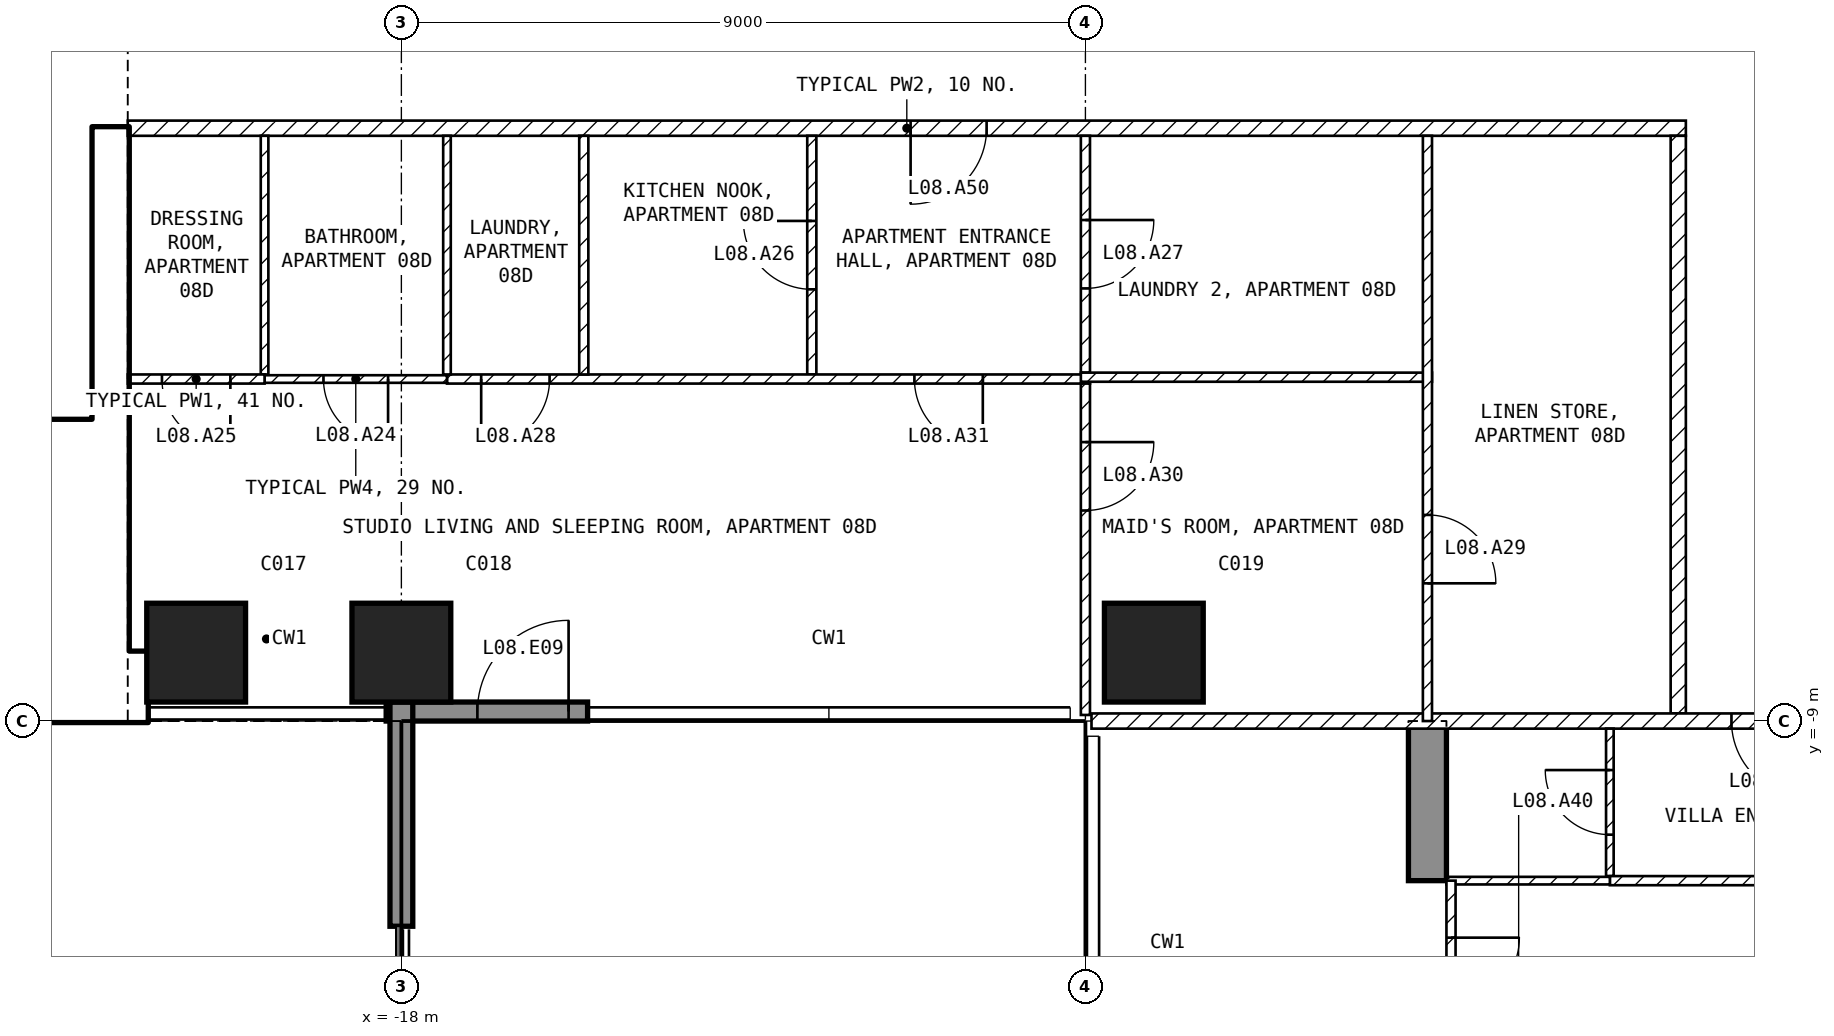
"""IFC4 building model, lengths in metres.
Left out: names, types, materials, properties, quantities, classifications, styles, units other than length and angle.
Written with IfcOpenShell. Run it as: python <this file> out.ifc"""

import sys

from ifc_helpers import new_model, si_unit, direction, frame, frame_2d, origin, origin_2d, place, context, subcontext, project, spatial, polyline, rectangle, outline, extrude, element, fill, save


model = new_model("IFC4")
c1 = context("Model", 3, precision=1e-05, world=origin(), true_north=direction((0.0, 1.0)))
c2 = subcontext(c1, "Body", "Model", "MODEL_VIEW")
j1 = project(units=[si_unit("LENGTHUNIT", "METRE"), si_unit("PLANEANGLEUNIT", "RADIAN")], contexts=[c1])
p1 = place(None, origin())
s1 = spatial("IfcSite", under=j1, at=p1, CompositionType="ELEMENT")
p2 = place(p1, origin())
s2 = spatial("IfcBuilding", under=s1, at=p2, CompositionType="ELEMENT")
p3 = place(p2, frame((0.0, 0.0, 47.0)))
s3 = spatial("IfcBuildingStorey", under=s2, at=p3, CompositionType="ELEMENT", Elevation=47.0)
for number, where, z_axis, x_axis in (
    (1, (-20.7, -8.1, -0.25), (0.0, 0.0, 1.0), (1.0, 0.0, 0.0)),
    (2, (-18.0, -8.1, -0.25), (0.0, 0.0, 1.0), (1.0, 0.0, 0.0)),
    (3, (-8.1, -8.1, -0.25), (0.0, 0.0, 1.0), (1.0, 0.0, 0.0)),
):
    element("IfcColumn", number, at=place(p3, frame(where, z_axis=z_axis, x_axis=x_axis)), inside=s3, PredefinedType="COLUMN", context=c2, shape_type="SweptSolid", body=[
        extrude(rectangle(XDim=1.3, YDim=1.3, at=origin_2d()), origin(), (0.0, 0.0, 1.0), 3.5),
    ])
p4 = place(p3, frame((-4.75, -25.45, -0.25), z_axis=(1.0, 0.0, 0.0), x_axis=(0.0, 1.0, 0.0)))
e4 = element("IfcWall", 4, at=p4, inside=s3, PredefinedType="SHEAR", context=c2, shape_type="SweptSolid", body=[
    extrude(outline(polyline([(0.0, 0.0), (4.15, 0.0), (4.15, 2.65), (6.55, 2.65), (6.55, 0.0), (11.95, 0.0), (11.95, 2.65), (14.35, 2.65), (14.35, 0.0), (16.45, 0.0), (16.45, 3.5), (0.0, 3.5), (0.0, 0.0)])), origin(), (0.0, 0.0, 1.0), 0.5),
])
p5 = place(p3, frame((-18.2, -8.875, 0.0), z_axis=(0.0, 0.0, 1.0), x_axis=(1.0, 0.0, 0.0)))
e5 = element("IfcWall", 5, at=p5, inside=s3, PredefinedType="SOLIDWALL", context=c2, shape_type="SweptSolid", body=[
    extrude(rectangle(XDim=2.65, YDim=0.25, at=frame_2d((1.325, 0.0))), origin(), (0.0, 0.0, 1.0), 3.25),
])
p6 = place(p5, frame((1.2, 0.0, 0.0)))
e6 = element("IfcOpeningElement", 6, at=p6, cuts=e5, PredefinedType="OPENING", context=c2, shape_type="SweptSolid", body=[
    extrude(rectangle(XDim=1.2, YDim=2.4, at=frame_2d((0.6, 1.2))), frame((0.0, 0.135, 0.0), z_axis=(0.0, -1.0, 0.0), x_axis=(1.0, 0.0, 0.0)), (0.0, 0.0, 1.0), 0.27),
])
p7 = place(p3, frame((-18.0, -8.75, 0.0), z_axis=(0.0, 0.0, 1.0), x_axis=(0.0, -1.0, 0.0)))
e7 = element("IfcWall", 7, at=p7, inside=s3, PredefinedType="SOLIDWALL", context=c2, shape_type="SweptSolid", body=[
    extrude(rectangle(XDim=2.95, YDim=0.3, at=frame_2d((1.475, 0.0))), origin(), (0.0, 0.0, 1.0), 3.25),
])
p8 = place(p3, frame((-32.4, -8.55, 0.0), z_axis=(0.0, 0.0, 1.0), x_axis=(1.0, 0.0, 0.0)))
e8 = element("IfcWall", 8, at=p8, inside=s3, PredefinedType="SHEAR", context=c2, shape_type="SweptSolid", body=[
    extrude(rectangle(XDim=11.05, YDim=0.9, at=frame_2d((5.525, 0.0))), origin(), (0.0, 0.0, 1.0), 3.25),
])
p9 = place(p3, frame((-21.825, -8.1, 0.0), z_axis=(0.0, 0.0, 1.0), x_axis=(0.0, 1.0, 0.0)))
e9 = element("IfcWall", 9, at=p9, inside=s3, PredefinedType="SHEAR", context=c2, shape_type="SweptSolid", body=[
    extrude(rectangle(XDim=6.9, YDim=0.45, at=frame_2d((3.45, 0.0))), origin(), (0.0, 0.0, 1.0), 3.25),
])
p10 = place(p3, frame((-28.35, -5.15, 0.0), z_axis=(0.0, 0.0, 1.0), x_axis=(1.0, 0.0, 0.0)))
e10 = element("IfcWall", 10, at=p10, inside=s3, PredefinedType="SOLIDWALL", context=c2, shape_type="SweptSolid", body=[
    extrude(rectangle(XDim=6.3, YDim=0.2, at=frame_2d((3.15, 0.0))), origin(), (0.0, 0.0, 1.0), 3.25),
])
p11 = place(p10, frame((5.1, 0.0, 0.0)))
e11 = element("IfcOpeningElement", 11, at=p11, cuts=e10, PredefinedType="OPENING", context=c2, shape_type="SweptSolid", body=[
    extrude(rectangle(XDim=1.0, YDim=2.1, at=frame_2d((0.5, 1.05))), frame((0.0, 0.11, 0.0), z_axis=(0.0, -1.0, 0.0), x_axis=(1.0, 0.0, 0.0)), (0.0, 0.0, 1.0), 0.22),
])
p12 = place(p3, frame((-1.1, -1.2, 0.0), z_axis=(0.0, 0.0, 1.0), x_axis=(-1.0, 0.0, 0.0)))
e12 = element("IfcWall", 12, at=p12, inside=s3, PredefinedType="PARTITIONING", context=c2, shape_type="SweptSolid", body=[
    extrude(rectangle(XDim=20.5, YDim=0.2, at=frame_2d((10.25, 0.0))), origin(), (0.0, 0.0, 1.0), 3.25),
])
p13 = place(p12, frame((9.2, 0.0, 0.0)))
e13 = element("IfcOpeningElement", 13, at=p13, cuts=e12, PredefinedType="OPENING", context=c2, shape_type="SweptSolid", body=[
    extrude(rectangle(XDim=1.0, YDim=2.1, at=frame_2d((0.5, 1.05))), frame((0.0, 0.11, 0.0), z_axis=(0.0, -1.0, 0.0), x_axis=(1.0, 0.0, 0.0)), (0.0, 0.0, 1.0), 0.22),
])
p14 = place(p3, frame((-1.2, -8.9, 0.0), z_axis=(0.0, 0.0, 1.0), x_axis=(0.0, 1.0, 0.0)))
e14 = element("IfcWall", 14, at=p14, inside=s3, PredefinedType="PARTITIONING", context=c2, shape_type="SweptSolid", body=[
    extrude(rectangle(XDim=7.6, YDim=0.2, at=frame_2d((3.8, 0.0))), origin(), (0.0, 0.0, 1.0), 3.25),
])
p15 = place(p3, frame((8.92, -9.0, 0.0), z_axis=(0.0, 0.0, 1.0), x_axis=(-1.0, 0.0, 0.0)))
e15 = element("IfcWall", 15, at=p15, inside=s3, PredefinedType="PARTITIONING", context=c2, shape_type="SweptSolid", body=[
    extrude(rectangle(XDim=17.84, YDim=0.2, at=frame_2d((8.92, 0.0))), origin(), (0.0, 0.0, 1.0), 3.25),
])
p16 = place(p15, frame((8.42, 0.0, 0.0)))
e16 = element("IfcOpeningElement", 16, at=p16, cuts=e15, PredefinedType="OPENING", context=c2, shape_type="SweptSolid", body=[
    extrude(rectangle(XDim=1.0, YDim=2.1, at=frame_2d((0.5, 1.05))), frame((0.0, 0.11, 0.0), z_axis=(0.0, -1.0, 0.0), x_axis=(1.0, 0.0, 0.0)), (0.0, 0.0, 1.0), 0.22),
])
p17 = place(p3, frame((-12.6, -4.44, 0.0), z_axis=(0.0, 0.0, 1.0), x_axis=(0.0, 1.0, 0.0)))
e17 = element("IfcWall", 17, at=p17, inside=s3, PredefinedType="PARTITIONING", context=c2, shape_type="SweptSolid", body=[
    extrude(rectangle(XDim=3.14, YDim=0.12, at=frame_2d((1.57, 0.0))), origin(), (0.0, 0.0, 1.0), 3.25),
])
p18 = place(p17, frame((1.12, 0.0, 0.0)))
e18 = element("IfcOpeningElement", 18, at=p18, cuts=e17, PredefinedType="OPENING", context=c2, shape_type="SweptSolid", body=[
    extrude(rectangle(XDim=0.9, YDim=2.1, at=frame_2d((0.45, 1.05))), frame((0.0, 0.07, 0.0), z_axis=(0.0, -1.0, 0.0), x_axis=(1.0, 0.0, 0.0)), (0.0, 0.0, 1.0), 0.14),
])
p19 = place(p3, frame((-8.94, -4.5, 0.0), z_axis=(0.0, 0.0, 1.0), x_axis=(-1.0, 0.0, 0.0)))
e19 = element("IfcWall", 19, at=p19, inside=s3, PredefinedType="PARTITIONING", context=c2, shape_type="SweptSolid", body=[
    extrude(rectangle(XDim=8.46, YDim=0.12, at=frame_2d((4.23, 0.0))), origin(), (0.0, 0.0, 1.0), 3.25),
])
p20 = place(p19, frame((7.11, 0.0, 0.0)))
e20 = element("IfcOpeningElement", 20, at=p20, cuts=e19, PredefinedType="OPENING", context=c2, shape_type="SweptSolid", body=[
    extrude(rectangle(XDim=0.9, YDim=2.1, at=frame_2d((0.45, 1.05))), frame((0.0, 0.07, 0.0), z_axis=(0.0, -1.0, 0.0), x_axis=(1.0, 0.0, 0.0)), (0.0, 0.0, 1.0), 0.14),
])
p21 = place(p19, frame((1.41, 0.0, 0.0)))
e21 = element("IfcOpeningElement", 21, at=p21, cuts=e19, PredefinedType="OPENING", context=c2, shape_type="SweptSolid", body=[
    extrude(rectangle(XDim=0.9, YDim=2.1, at=frame_2d((0.45, 1.05))), frame((0.0, 0.07, 0.0), z_axis=(0.0, -1.0, 0.0), x_axis=(1.0, 0.0, 0.0)), (0.0, 0.0, 1.0), 0.14),
])
p22 = place(p3, frame((-9.0, -1.3, 0.0), z_axis=(0.0, 0.0, 1.0), x_axis=(0.0, -1.0, 0.0)))
e22 = element("IfcWall", 22, at=p22, inside=s3, PredefinedType="PARTITIONING", context=c2, shape_type="SweptSolid", body=[
    extrude(rectangle(XDim=3.116, YDim=0.12, at=frame_2d((1.558, 0.0))), origin(), (0.0, 0.0, 1.0), 3.25),
])
p23 = place(p22, frame((1.108, 0.0, 0.0)))
e23 = element("IfcOpeningElement", 23, at=p23, cuts=e22, PredefinedType="OPENING", context=c2, shape_type="SweptSolid", body=[
    extrude(rectangle(XDim=0.9, YDim=2.1, at=frame_2d((0.45, 1.05))), frame((0.0, 0.07, 0.0), z_axis=(0.0, -1.0, 0.0), x_axis=(1.0, 0.0, 0.0)), (0.0, 0.0, 1.0), 0.14),
])
p24 = place(p3, frame((-15.6, -4.44, 0.0), z_axis=(0.0, 0.0, 1.0), x_axis=(0.0, 1.0, 0.0)))
e24 = element("IfcWall", 24, at=p24, inside=s3, PredefinedType="PARTITIONING", context=c2, shape_type="SweptSolid", body=[
    extrude(rectangle(XDim=3.14, YDim=0.12, at=frame_2d((1.57, 0.0))), origin(), (0.0, 0.0, 1.0), 3.25),
])
for number, where, z_axis, x_axis in (
    (25, (-17.4, -4.44, 0.0), (0.0, 0.0, 1.0), (0.0, 1.0, 0.0)),
    (26, (-19.8, -4.44, 0.0), (0.0, 0.0, 1.0), (0.0, 1.0, 0.0)),
):
    element("IfcWall", number, at=place(p3, frame(where, z_axis=z_axis, x_axis=x_axis)), inside=s3, PredefinedType="PARTITIONING", context=c2, shape_type="SweptSolid", body=[
        extrude(rectangle(XDim=3.14, YDim=0.1, at=frame_2d((1.57, 0.0))), origin(), (0.0, 0.0, 1.0), 3.25),
    ])
p25 = place(p3, frame((-17.4, -4.5, 0.0), z_axis=(0.0, 0.0, 1.0), x_axis=(-1.0, 0.0, 0.0)))
e27 = element("IfcWall", 27, at=p25, inside=s3, PredefinedType="PARTITIONING", context=c2, shape_type="SweptSolid", body=[
    extrude(rectangle(XDim=2.4, YDim=0.1, at=frame_2d((1.2, 0.0))), origin(), (0.0, 0.0, 1.0), 3.25),
])
p26 = place(p25, frame((0.775, 0.0, 0.0)))
e28 = element("IfcOpeningElement", 28, at=p26, cuts=e27, PredefinedType="OPENING", context=c2, shape_type="SweptSolid", body=[
    extrude(rectangle(XDim=0.85, YDim=2.1, at=frame_2d((0.425, 1.05))), frame((0.0, 0.06, 0.0), z_axis=(0.0, -1.0, 0.0), x_axis=(1.0, 0.0, 0.0)), (0.0, 0.0, 1.0), 0.12),
])
p27 = place(p3, frame((-19.8, -4.5, 0.0), z_axis=(0.0, 0.0, 1.0), x_axis=(-1.0, 0.0, 0.0)))
e29 = element("IfcWall", 29, at=p27, inside=s3, PredefinedType="PARTITIONING", context=c2, shape_type="SweptSolid", body=[
    extrude(rectangle(XDim=1.8, YDim=0.12, at=frame_2d((0.9, 0.0))), origin(), (0.0, 0.0, 1.0), 3.25),
])
p28 = place(p27, frame((0.45, 0.0, 0.0)))
e30 = element("IfcOpeningElement", 30, at=p28, cuts=e29, PredefinedType="OPENING", context=c2, shape_type="SweptSolid", body=[
    extrude(rectangle(XDim=0.9, YDim=2.1, at=frame_2d((0.45, 1.05))), frame((0.0, 0.07, 0.0), z_axis=(0.0, -1.0, 0.0), x_axis=(1.0, 0.0, 0.0)), (0.0, 0.0, 1.0), 0.14),
])
p29 = place(p3, frame((-9.0, -4.56, 0.0), z_axis=(0.0, 0.0, 1.0), x_axis=(0.0, -1.0, 0.0)))
e31 = element("IfcWall", 31, at=p29, inside=s3, PredefinedType="PARTITIONING", context=c2, shape_type="SweptSolid", body=[
    extrude(rectangle(XDim=4.36, YDim=0.12, at=frame_2d((2.18, 0.0))), origin(), (0.0, 0.0, 1.0), 3.25),
])
p30 = place(p29, frame((0.77, 0.0, 0.0)))
e32 = element("IfcOpeningElement", 32, at=p30, cuts=e31, PredefinedType="OPENING", context=c2, shape_type="SweptSolid", body=[
    extrude(rectangle(XDim=0.9, YDim=2.1, at=frame_2d((0.45, 1.05))), frame((0.0, 0.07, 0.0), z_axis=(0.0, -1.0, 0.0), x_axis=(1.0, 0.0, 0.0)), (0.0, 0.0, 1.0), 0.14),
])
p31 = place(p3, frame((-4.44, -4.476, 0.0), z_axis=(0.0, 0.0, 1.0), x_axis=(-1.0, 0.0, 0.0)))
e33 = element("IfcWall", 33, at=p31, inside=s3, PredefinedType="PARTITIONING", context=c2, shape_type="SweptSolid", body=[
    extrude(rectangle(XDim=4.62, YDim=0.12, at=frame_2d((2.31, 0.0))), origin(), (0.0, 0.0, 1.0), 3.25),
])
p32 = place(p3, frame((-4.5, -1.3, 0.0), z_axis=(0.0, 0.0, 1.0), x_axis=(0.0, -1.0, 0.0)))
e34 = element("IfcWall", 34, at=p32, inside=s3, PredefinedType="PARTITIONING", context=c2, shape_type="SweptSolid", body=[
    extrude(rectangle(XDim=7.7, YDim=0.12, at=frame_2d((3.85, 0.0))), origin(), (0.0, 0.0, 1.0), 3.25),
])
p33 = place(p32, frame((4.988, 0.0, 0.0)))
e35 = element("IfcOpeningElement", 35, at=p33, cuts=e34, PredefinedType="OPENING", context=c2, shape_type="SweptSolid", body=[
    extrude(rectangle(XDim=0.9, YDim=2.1, at=frame_2d((0.45, 1.05))), frame((0.0, 0.07, 0.0), z_axis=(0.0, -1.0, 0.0), x_axis=(1.0, 0.0, 0.0)), (0.0, 0.0, 1.0), 0.14),
])
p34 = place(p3, frame((-2.1, -11.04, 0.0), z_axis=(0.0, 0.0, 1.0), x_axis=(0.0, 1.0, 0.0)))
e36 = element("IfcWall", 36, at=p34, inside=s3, PredefinedType="PARTITIONING", context=c2, shape_type="SweptSolid", body=[
    extrude(rectangle(XDim=1.94, YDim=0.1, at=frame_2d((0.97, 0.0))), origin(), (0.0, 0.0, 1.0), 3.25),
])
p35 = place(p34, frame((0.545, 0.0, 0.0)))
e37 = element("IfcOpeningElement", 37, at=p35, cuts=e36, PredefinedType="OPENING", context=c2, shape_type="SweptSolid", body=[
    extrude(rectangle(XDim=0.85, YDim=2.1, at=frame_2d((0.425, 1.05))), frame((0.0, 0.06, 0.0), z_axis=(0.0, -1.0, 0.0), x_axis=(1.0, 0.0, 0.0)), (0.0, 0.0, 1.0), 0.12),
])
p36 = place(p3, frame((4.25, -11.1, 0.0), z_axis=(0.0, 0.0, 1.0), x_axis=(-1.0, 0.0, 0.0)))
e38 = element("IfcWall", 38, at=p36, inside=s3, PredefinedType="PARTITIONING", context=c2, shape_type="SweptSolid", body=[
    extrude(rectangle(XDim=6.35, YDim=0.12, at=frame_2d((3.175, 0.0))), origin(), (0.0, 0.0, 1.0), 3.25),
])
p37 = place(p36, frame((2.725, 0.0, 0.0)))
e39 = element("IfcOpeningElement", 39, at=p37, cuts=e38, PredefinedType="OPENING", context=c2, shape_type="SweptSolid", body=[
    extrude(rectangle(XDim=0.9, YDim=2.1, at=frame_2d((0.45, 1.05))), frame((0.0, 0.07, 0.0), z_axis=(0.0, -1.0, 0.0), x_axis=(1.0, 0.0, 0.0)), (0.0, 0.0, 1.0), 0.14),
])
p38 = place(p3, frame((-2.1, -11.1, 0.0), z_axis=(0.0, 0.0, 1.0), x_axis=(-1.0, 0.0, 0.0)))
e40 = element("IfcWall", 40, at=p38, inside=s3, PredefinedType="PARTITIONING", context=c2, shape_type="SweptSolid", body=[
    extrude(rectangle(XDim=2.15, YDim=0.1, at=frame_2d((1.075, 0.0))), origin(), (0.0, 0.0, 1.0), 3.25),
])
p39 = place(p3, frame((-4.19, -11.1, 0.0), z_axis=(0.0, 0.0, 1.0), x_axis=(0.0, -1.0, 0.0)))
e41 = element("IfcWall", 41, at=p39, inside=s3, PredefinedType="PARTITIONING", context=c2, shape_type="SweptSolid", body=[
    extrude(rectangle(XDim=2.4, YDim=0.12, at=frame_2d((1.2, 0.0))), origin(), (0.0, 0.0, 1.0), 2.4),
])
p40 = place(p39, frame((0.75, 0.0, 0.0)))
e42 = element("IfcOpeningElement", 42, at=p40, cuts=e41, PredefinedType="OPENING", context=c2, shape_type="SweptSolid", body=[
    extrude(rectangle(XDim=0.9, YDim=2.1, at=frame_2d((0.45, 1.05))), frame((0.0, 0.07, 0.0), z_axis=(0.0, -1.0, 0.0), x_axis=(1.0, 0.0, 0.0)), (0.0, 0.0, 1.0), 0.14),
])
p41 = place(p6, origin())
e43 = element("IfcDoor", 43, at=p41, inside=s3, OperationType="SINGLE_SWING_RIGHT", PredefinedType="DOOR", context=c2, shape_type="SweptSolid", body=[
    extrude(rectangle(XDim=1.2, YDim=2.4, at=frame_2d((0.6, 1.2))), frame((0.0, 0.025, 0.0), z_axis=(0.0, -1.0, 0.0), x_axis=(1.0, 0.0, 0.0)), (0.0, 0.0, 1.0), 0.05),
])
fill(e6, e43)
p42 = place(p11, origin())
e44 = element("IfcDoor", 44, at=p42, inside=s3, OperationType="SINGLE_SWING_LEFT", PredefinedType="DOOR", context=c2, shape_type="SweptSolid", body=[
    extrude(rectangle(XDim=1.0, YDim=2.1, at=frame_2d((0.5, 1.05))), frame((0.0, 0.025, 0.0), z_axis=(0.0, -1.0, 0.0), x_axis=(1.0, 0.0, 0.0)), (0.0, 0.0, 1.0), 0.05),
])
fill(e11, e44)
p43 = place(p26, origin())
e45 = element("IfcDoor", 45, at=p43, inside=s3, OperationType="SINGLE_SWING_LEFT", PredefinedType="DOOR", context=c2, shape_type="SweptSolid", body=[
    extrude(rectangle(XDim=0.85, YDim=2.1, at=frame_2d((0.425, 1.05))), frame((0.0, 0.025, 0.0), z_axis=(0.0, -1.0, 0.0), x_axis=(1.0, 0.0, 0.0)), (0.0, 0.0, 1.0), 0.05),
])
fill(e28, e45)
p44 = place(p28, origin())
e46 = element("IfcDoor", 46, at=p44, inside=s3, OperationType="SINGLE_SWING_LEFT", PredefinedType="DOOR", context=c2, shape_type="SweptSolid", body=[
    extrude(rectangle(XDim=0.9, YDim=2.1, at=frame_2d((0.45, 1.05))), frame((0.0, 0.025, 0.0), z_axis=(0.0, -1.0, 0.0), x_axis=(1.0, 0.0, 0.0)), (0.0, 0.0, 1.0), 0.05),
])
fill(e30, e46)
p45 = place(p18, origin())
e47 = element("IfcDoor", 47, at=p45, inside=s3, OperationType="SINGLE_SWING_RIGHT", PredefinedType="DOOR", context=c2, shape_type="SweptSolid", body=[
    extrude(rectangle(XDim=0.9, YDim=2.1, at=frame_2d((0.45, 1.05))), frame((0.0, 0.025, 0.0), z_axis=(0.0, -1.0, 0.0), x_axis=(1.0, 0.0, 0.0)), (0.0, 0.0, 1.0), 0.05),
])
fill(e18, e47)
p46 = place(p23, origin())
e48 = element("IfcDoor", 48, at=p46, inside=s3, OperationType="SINGLE_SWING_LEFT", PredefinedType="DOOR", context=c2, shape_type="SweptSolid", body=[
    extrude(rectangle(XDim=0.9, YDim=2.1, at=frame_2d((0.45, 1.05))), frame((0.0, 0.025, 0.0), z_axis=(0.0, -1.0, 0.0), x_axis=(1.0, 0.0, 0.0)), (0.0, 0.0, 1.0), 0.05),
])
fill(e23, e48)
p47 = place(p20, origin())
e49 = element("IfcDoor", 49, at=p47, inside=s3, OperationType="SINGLE_SWING_RIGHT", PredefinedType="DOOR", context=c2, shape_type="SweptSolid", body=[
    extrude(rectangle(XDim=0.9, YDim=2.1, at=frame_2d((0.45, 1.05))), frame((0.0, 0.025, 0.0), z_axis=(0.0, -1.0, 0.0), x_axis=(1.0, 0.0, 0.0)), (0.0, 0.0, 1.0), 0.05),
])
fill(e20, e49)
p48 = place(p33, origin())
e50 = element("IfcDoor", 50, at=p48, inside=s3, OperationType="SINGLE_SWING_RIGHT", PredefinedType="DOOR", context=c2, shape_type="SweptSolid", body=[
    extrude(rectangle(XDim=0.9, YDim=2.1, at=frame_2d((0.45, 1.05))), frame((0.0, 0.025, 0.0), z_axis=(0.0, -1.0, 0.0), x_axis=(1.0, 0.0, 0.0)), (0.0, 0.0, 1.0), 0.05),
])
fill(e35, e50)
p49 = place(p30, origin())
e51 = element("IfcDoor", 51, at=p49, inside=s3, OperationType="SINGLE_SWING_LEFT", PredefinedType="DOOR", context=c2, shape_type="SweptSolid", body=[
    extrude(rectangle(XDim=0.9, YDim=2.1, at=frame_2d((0.45, 1.05))), frame((0.0, 0.025, 0.0), z_axis=(0.0, -1.0, 0.0), x_axis=(1.0, 0.0, 0.0)), (0.0, 0.0, 1.0), 0.05),
])
fill(e32, e51)
p50 = place(p21, origin())
e52 = element("IfcDoor", 52, at=p50, inside=s3, OperationType="SINGLE_SWING_LEFT", PredefinedType="DOOR", context=c2, shape_type="SweptSolid", body=[
    extrude(rectangle(XDim=0.9, YDim=2.1, at=frame_2d((0.45, 1.05))), frame((0.0, 0.025, 0.0), z_axis=(0.0, -1.0, 0.0), x_axis=(1.0, 0.0, 0.0)), (0.0, 0.0, 1.0), 0.05),
])
fill(e21, e52)
p51 = place(p16, origin())
e53 = element("IfcDoor", 53, at=p51, inside=s3, OperationType="SINGLE_SWING_LEFT", PredefinedType="DOOR", context=c2, shape_type="SweptSolid", body=[
    extrude(rectangle(XDim=1.0, YDim=2.1, at=frame_2d((0.5, 1.05))), frame((0.0, 0.025, 0.0), z_axis=(0.0, -1.0, 0.0), x_axis=(1.0, 0.0, 0.0)), (0.0, 0.0, 1.0), 0.05),
])
fill(e16, e53)
p52 = place(p35, origin())
e54 = element("IfcDoor", 54, at=p52, inside=s3, OperationType="SINGLE_SWING_RIGHT", PredefinedType="DOOR", context=c2, shape_type="SweptSolid", body=[
    extrude(rectangle(XDim=0.85, YDim=2.1, at=frame_2d((0.425, 1.05))), frame((0.0, 0.025, 0.0), z_axis=(0.0, -1.0, 0.0), x_axis=(1.0, 0.0, 0.0)), (0.0, 0.0, 1.0), 0.05),
])
fill(e37, e54)
p53 = place(p13, origin())
e55 = element("IfcDoor", 55, at=p53, inside=s3, OperationType="SINGLE_SWING_RIGHT", PredefinedType="DOOR", context=c2, shape_type="SweptSolid", body=[
    extrude(rectangle(XDim=1.0, YDim=2.1, at=frame_2d((0.5, 1.05))), frame((0.0, 0.025, 0.0), z_axis=(0.0, -1.0, 0.0), x_axis=(1.0, 0.0, 0.0)), (0.0, 0.0, 1.0), 0.05),
])
fill(e13, e55)
p54 = place(p40, origin())
e56 = element("IfcDoor", 56, at=p54, inside=s3, OperationType="SINGLE_SWING_LEFT", PredefinedType="DOOR", context=c2, shape_type="SweptSolid", body=[
    extrude(rectangle(XDim=0.9, YDim=2.1, at=frame_2d((0.45, 1.05))), frame((0.0, 0.025, 0.0), z_axis=(0.0, -1.0, 0.0), x_axis=(1.0, 0.0, 0.0)), (0.0, 0.0, 1.0), 0.05),
])
fill(e42, e56)
save(model, sys.argv[1])
